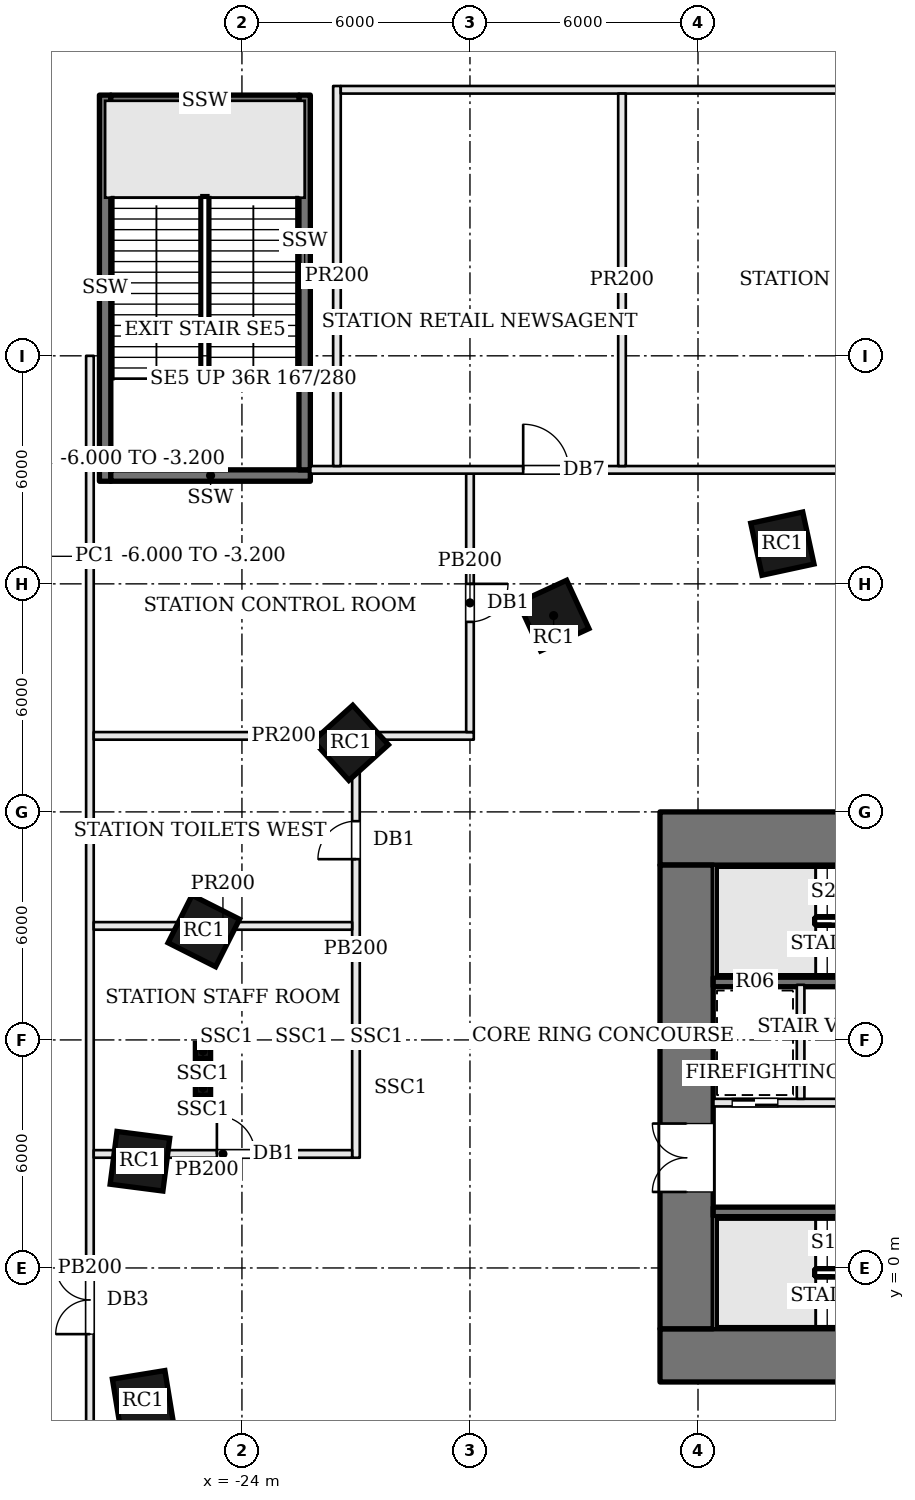
"""IFC4 building model, lengths in metres.
Left out: names, types, materials, properties, quantities, classifications, styles, units other than length and angle.
Written with IfcOpenShell. Run it as: python <this file> out.ifc"""

import sys

from ifc_helpers import new_model, si_unit, direction, frame, frame_2d, origin, origin_2d, place, context, subcontext, project, spatial, rectangle, extrude, element, fill, save


model = new_model("IFC4")
c1 = context("Model", 3, precision=1e-05, world=origin(), true_north=direction((0.0, 1.0)))
c2 = subcontext(c1, "Body", "Model", "MODEL_VIEW")
j1 = project(units=[si_unit("LENGTHUNIT", "METRE"), si_unit("PLANEANGLEUNIT", "RADIAN")], contexts=[c1])
p1 = place(None, origin())
s1 = spatial("IfcSite", under=j1, at=p1, CompositionType="ELEMENT")
p2 = place(p1, origin())
s2 = spatial("IfcBuilding", under=s1, at=p2, CompositionType="ELEMENT")
p3 = place(p2, frame((0.0, 0.0, -6.0)))
s3 = spatial("IfcBuildingStorey", under=s2, at=p3, CompositionType="ELEMENT", Elevation=-6.0)
p4 = place(p3, frame((-13.0, 11.3, 0.0), z_axis=(0.0, 0.0, 1.0), x_axis=(1.0, 0.0, 0.0)))
e1 = element("IfcWall", 1, at=p4, inside=s3, PredefinedType="SHEAR", context=c2, shape_type="SweptSolid", body=[
    extrude(rectangle(XDim=26.0, YDim=1.4, at=frame_2d((13.0, 0.0))), origin(), (0.0, 0.0, 1.0), 6.0),
])
p5 = place(p4, frame((9.375, 0.0, 0.0)))
e2 = element("IfcOpeningElement", 2, at=p5, cuts=e1, PredefinedType="OPENING", context=c2, shape_type="SweptSolid", body=[
    extrude(rectangle(XDim=0.7, YDim=2.1, at=frame_2d((0.35, 1.05))), frame((0.0, 0.71, 0.0), z_axis=(0.0, -1.0, 0.0), x_axis=(1.0, 0.0, 0.0)), (0.0, 0.0, 1.0), 1.42),
])
p6 = place(p4, frame((12.625, 0.0, 0.0)))
e3 = element("IfcOpeningElement", 3, at=p6, cuts=e1, PredefinedType="OPENING", context=c2, shape_type="SweptSolid", body=[
    extrude(rectangle(XDim=0.7, YDim=2.1, at=frame_2d((0.35, 1.05))), frame((0.0, 0.71, 0.0), z_axis=(0.0, -1.0, 0.0), x_axis=(1.0, 0.0, 0.0)), (0.0, 0.0, 1.0), 1.42),
])
p7 = place(p4, frame((14.8, 0.0, 0.0)))
e4 = element("IfcOpeningElement", 4, at=p7, cuts=e1, PredefinedType="OPENING", context=c2, shape_type="SweptSolid", body=[
    extrude(rectangle(XDim=1.0, YDim=2.1, at=frame_2d((0.5, 1.05))), frame((0.0, 0.71, 0.0), z_axis=(0.0, -1.0, 0.0), x_axis=(1.0, 0.0, 0.0)), (0.0, 0.0, 1.0), 1.42),
])
p8 = place(p3, frame((-13.0, -2.3, 0.0), z_axis=(0.0, 0.0, 1.0), x_axis=(1.0, 0.0, 0.0)))
e5 = element("IfcWall", 5, at=p8, inside=s3, PredefinedType="SHEAR", context=c2, shape_type="SweptSolid", body=[
    extrude(rectangle(XDim=26.0, YDim=1.4, at=frame_2d((13.0, 0.0))), origin(), (0.0, 0.0, 1.0), 6.0),
])
p9 = place(p8, frame((9.125, 0.0, 0.0)))
e6 = element("IfcOpeningElement", 6, at=p9, cuts=e5, PredefinedType="OPENING", context=c2, shape_type="SweptSolid", body=[
    extrude(rectangle(XDim=1.2, YDim=2.1, at=frame_2d((0.6, 1.05))), frame((0.0, 0.71, 0.0), z_axis=(0.0, -1.0, 0.0), x_axis=(1.0, 0.0, 0.0)), (0.0, 0.0, 1.0), 1.42),
])
p10 = place(p8, frame((12.625, 0.0, 0.0)))
e7 = element("IfcOpeningElement", 7, at=p10, cuts=e5, PredefinedType="OPENING", context=c2, shape_type="SweptSolid", body=[
    extrude(rectangle(XDim=0.7, YDim=2.1, at=frame_2d((0.35, 1.05))), frame((0.0, 0.71, 0.0), z_axis=(0.0, -1.0, 0.0), x_axis=(1.0, 0.0, 0.0)), (0.0, 0.0, 1.0), 1.42),
])
p11 = place(p8, frame((15.75, 0.0, 0.0)))
e8 = element("IfcOpeningElement", 8, at=p11, cuts=e5, PredefinedType="OPENING", context=c2, shape_type="SweptSolid", body=[
    extrude(rectangle(XDim=1.0, YDim=2.1, at=frame_2d((0.5, 1.05))), frame((0.0, 0.71, 0.0), z_axis=(0.0, -1.0, 0.0), x_axis=(1.0, 0.0, 0.0)), (0.0, 0.0, 1.0), 1.42),
])
p12 = place(p3, frame((-12.3, -1.6, 0.0), z_axis=(0.0, 0.0, 1.0), x_axis=(0.0, 1.0, 0.0)))
e9 = element("IfcWall", 9, at=p12, inside=s3, PredefinedType="SHEAR", context=c2, shape_type="SweptSolid", body=[
    extrude(rectangle(XDim=12.2, YDim=1.4, at=frame_2d((6.1, 0.0))), origin(), (0.0, 0.0, 1.0), 6.0),
])
p13 = place(p12, frame((3.6, 0.0, 0.0)))
e10 = element("IfcOpeningElement", 10, at=p13, cuts=e9, PredefinedType="OPENING", context=c2, shape_type="SweptSolid", body=[
    extrude(rectangle(XDim=1.8, YDim=2.1, at=frame_2d((0.9, 1.05))), frame((0.0, 0.71, 0.0), z_axis=(0.0, -1.0, 0.0), x_axis=(1.0, 0.0, 0.0)), (0.0, 0.0, 1.0), 1.42),
])
for number, where, z_axis, x_axis in (
    (11, (-9.78, 19.058, 0.0), (0.0, 0.0, 1.0), (-0.977, -0.211, 0.0)),
    (12, (-15.799, 17.165, 0.0), (0.0, 0.0, 1.0), (-0.908, -0.419, 0.0)),
    (13, (-21.135, 13.817, 0.0), (0.0, 0.0, 1.0), (-0.743, -0.67, 0.0)),
    (14, (-25.003, 8.866, 0.0), (0.0, 0.0, 1.0), (-0.45, -0.893, 0.0)),
    (15, (-26.684, 2.808, 0.0), (0.0, 0.0, 1.0), (-0.128, -0.992, 0.0)),
    (16, (-26.605, -3.503, 0.0), (0.0, 0.0, 1.0), (0.161, -0.987, 0.0)),
):
    element("IfcColumn", number, at=place(p3, frame(where, z_axis=z_axis, x_axis=x_axis)), inside=s3, PredefinedType="COLUMN", context=c2, shape_type="SweptSolid", body=[
        extrude(rectangle(XDim=1.4, YDim=1.4, at=origin_2d()), origin(), (0.0, 0.0, 1.0), 6.0),
    ])
p14 = place(p3, frame((-11.6, 1.475, 0.0), z_axis=(0.0, 0.0, 1.0), x_axis=(1.0, 0.0, 0.0)))
e17 = element("IfcWall", 17, at=p14, inside=s3, PredefinedType="SOLIDWALL", context=c2, shape_type="SweptSolid", body=[
    extrude(rectangle(XDim=6.5, YDim=0.25, at=frame_2d((3.25, 0.0))), origin(), (0.0, 0.0, 1.0), 5.65),
])
p15 = place(p14, frame((5.2, 0.0, 0.0)))
e18 = element("IfcOpeningElement", 18, at=p15, cuts=e17, PredefinedType="OPENING", context=c2, shape_type="SweptSolid", body=[
    extrude(rectangle(XDim=1.2, YDim=2.1, at=frame_2d((0.6, 1.05))), frame((0.0, 0.135, 0.0), z_axis=(0.0, -1.0, 0.0), x_axis=(1.0, 0.0, 0.0)), (0.0, 0.0, 1.0), 0.27),
])
p16 = place(p3, frame((-11.6, 4.35, 0.0), z_axis=(0.0, 0.0, 1.0), x_axis=(1.0, 0.0, 0.0)))
e19 = element("IfcWall", 19, at=p16, inside=s3, PredefinedType="SOLIDWALL", context=c2, shape_type="SweptSolid", body=[
    extrude(rectangle(XDim=6.5, YDim=0.2, at=frame_2d((3.25, 0.0))), origin(), (0.0, 0.0, 1.0), 5.65),
])
p17 = place(p16, frame((3.8, 0.0, 0.0)))
e20 = element("IfcOpeningElement", 20, at=p17, cuts=e19, PredefinedType="OPENING", context=c2, shape_type="SweptSolid", body=[
    extrude(rectangle(XDim=1.2, YDim=2.1, at=frame_2d((0.6, 1.05))), frame((0.0, 0.11, 0.0), z_axis=(0.0, -1.0, 0.0), x_axis=(1.0, 0.0, 0.0)), (0.0, 0.0, 1.0), 0.22),
])
p18 = place(p16, frame((0.5, 0.0, 0.0)))
e21 = element("IfcOpeningElement", 21, at=p18, cuts=e19, PredefinedType="OPENING", context=c2, shape_type="SweptSolid", body=[
    extrude(rectangle(XDim=1.2, YDim=2.1, at=frame_2d((0.6, 1.05))), frame((0.0, 0.11, 0.0), z_axis=(0.0, -1.0, 0.0), x_axis=(1.0, 0.0, 0.0)), (0.0, 0.0, 1.0), 0.22),
])
p19 = place(p3, frame((-11.6, 7.525, 0.0), z_axis=(0.0, 0.0, 1.0), x_axis=(1.0, 0.0, 0.0)))
e22 = element("IfcWall", 22, at=p19, inside=s3, PredefinedType="SOLIDWALL", context=c2, shape_type="SweptSolid", body=[
    extrude(rectangle(XDim=6.5, YDim=0.25, at=frame_2d((3.25, 0.0))), origin(), (0.0, 0.0, 1.0), 5.65),
])
p20 = place(p19, frame((5.2, 0.0, 0.0)))
e23 = element("IfcOpeningElement", 23, at=p20, cuts=e22, PredefinedType="OPENING", context=c2, shape_type="SweptSolid", body=[
    extrude(rectangle(XDim=1.2, YDim=2.1, at=frame_2d((0.6, 1.05))), frame((0.0, 0.135, 0.0), z_axis=(0.0, -1.0, 0.0), x_axis=(1.0, 0.0, 0.0)), (0.0, 0.0, 1.0), 0.27),
])
p21 = place(p3, frame((-9.3, 4.45, 0.0), z_axis=(0.0, 0.0, 1.0), x_axis=(0.0, 1.0, 0.0)))
e24 = element("IfcWall", 24, at=p21, inside=s3, PredefinedType="SOLIDWALL", context=c2, shape_type="SweptSolid", body=[
    extrude(rectangle(XDim=3.0, YDim=0.2, at=frame_2d((1.5, 0.0))), origin(), (0.0, 0.0, 1.0), 5.65),
])
p22 = place(p3, frame((-28.0, -24.0, 0.0), z_axis=(0.0, 0.0, 1.0), x_axis=(0.0, 1.0, 0.0)))
e25 = element("IfcWall", 25, at=p22, inside=s3, PredefinedType="PARTITIONING", context=c2, shape_type="SweptSolid", body=[
    extrude(rectangle(XDim=48.0, YDim=0.2, at=frame_2d((24.0, 0.0))), origin(), (0.0, 0.0, 1.0), 5.148),
])
p23 = place(p22, frame((22.259, 0.0, 0.0)))
e26 = element("IfcOpeningElement", 26, at=p23, cuts=e25, PredefinedType="OPENING", context=c2, shape_type="SweptSolid", body=[
    extrude(rectangle(XDim=1.8, YDim=2.1, at=frame_2d((0.9, 1.05))), frame((0.0, 0.11, 0.0), z_axis=(0.0, -1.0, 0.0), x_axis=(1.0, 0.0, 0.0)), (0.0, 0.0, 1.0), 0.22),
])
p24 = place(p3, frame((-21.0, 2.9, 0.0), z_axis=(0.0, 0.0, 1.0), x_axis=(0.0, 1.0, 0.0)))
e27 = element("IfcWall", 27, at=p24, inside=s3, PredefinedType="PARTITIONING", context=c2, shape_type="SweptSolid", body=[
    extrude(rectangle(XDim=11.0, YDim=0.2, at=frame_2d((5.5, 0.0))), origin(), (0.0, 0.0, 1.0), 5.148),
])
p25 = place(p24, frame((7.856, 0.0, 0.0)))
e28 = element("IfcOpeningElement", 28, at=p25, cuts=e27, PredefinedType="OPENING", context=c2, shape_type="SweptSolid", body=[
    extrude(rectangle(XDim=1.0, YDim=2.1, at=frame_2d((0.5, 1.05))), frame((0.0, 0.11, 0.0), z_axis=(0.0, -1.0, 0.0), x_axis=(1.0, 0.0, 0.0)), (0.0, 0.0, 1.0), 0.22),
])
p26 = place(p3, frame((-17.9, 14.0, 0.0), z_axis=(0.0, 0.0, 1.0), x_axis=(-1.0, 0.0, 0.0)))
e29 = element("IfcWall", 29, at=p26, inside=s3, PredefinedType="PARTITIONING", context=c2, shape_type="SweptSolid", body=[
    extrude(rectangle(XDim=10.0, YDim=0.2, at=frame_2d((5.0, 0.0))), origin(), (0.0, 0.0, 1.0), 5.134),
])
p27 = place(p3, frame((-27.9, 9.0, 0.0), z_axis=(0.0, 0.0, 1.0), x_axis=(1.0, 0.0, 0.0)))
e30 = element("IfcWall", 30, at=p27, inside=s3, PredefinedType="PARTITIONING", context=c2, shape_type="SweptSolid", body=[
    extrude(rectangle(XDim=6.8, YDim=0.2, at=frame_2d((3.4, 0.0))), origin(), (0.0, 0.0, 1.0), 5.134),
])
p28 = place(p3, frame((-18.0, 20.9, 0.0), z_axis=(0.0, 0.0, 1.0), x_axis=(0.0, -1.0, 0.0)))
e31 = element("IfcWall", 31, at=p28, inside=s3, PredefinedType="PARTITIONING", context=c2, shape_type="SweptSolid", body=[
    extrude(rectangle(XDim=6.8, YDim=0.2, at=frame_2d((3.4, 0.0))), origin(), (0.0, 0.0, 1.0), 5.148),
])
p29 = place(p28, frame((2.9, 0.0, 0.0)))
e32 = element("IfcOpeningElement", 32, at=p29, cuts=e31, PredefinedType="OPENING", context=c2, shape_type="SweptSolid", body=[
    extrude(rectangle(XDim=1.0, YDim=2.1, at=frame_2d((0.5, 1.05))), frame((0.0, 0.11, 0.0), z_axis=(0.0, -1.0, 0.0), x_axis=(1.0, 0.0, 0.0)), (0.0, 0.0, 1.0), 0.22),
])
p30 = place(p3, frame((-27.6, 30.86, 0.0), z_axis=(0.0, 0.0, 1.0), x_axis=(0.0, -1.0, 0.0)))
e33 = element("IfcWall", 33, at=p30, inside=s3, PredefinedType="SOLIDWALL", context=c2, shape_type="SweptSolid", body=[
    extrude(rectangle(XDim=10.16, YDim=0.3, at=frame_2d((5.08, 0.0))), origin(), (0.0, 0.0, 1.0), 5.65),
])
p31 = place(p3, frame((-27.45, 20.85, 0.0), z_axis=(0.0, 0.0, 1.0), x_axis=(1.0, 0.0, 0.0)))
e34 = element("IfcWall", 34, at=p31, inside=s3, PredefinedType="SOLIDWALL", context=c2, shape_type="SweptSolid", body=[
    extrude(rectangle(XDim=5.25, YDim=0.3, at=frame_2d((2.625, 0.0))), origin(), (0.0, 0.0, 1.0), 5.65),
])
p32 = place(p3, frame((-22.35, 21.0, 0.0), z_axis=(0.0, 0.0, 1.0), x_axis=(0.0, 1.0, 0.0)))
e35 = element("IfcWall", 35, at=p32, inside=s3, PredefinedType="SOLIDWALL", context=c2, shape_type="SweptSolid", body=[
    extrude(rectangle(XDim=9.86, YDim=0.3, at=frame_2d((4.93, 0.0))), origin(), (0.0, 0.0, 1.0), 5.65),
])
p33 = place(p3, frame((-22.2, 21.0, 0.0), z_axis=(0.0, 0.0, 1.0), x_axis=(1.0, 0.0, 0.0)))
e36 = element("IfcWall", 36, at=p33, inside=s3, PredefinedType="PARTITIONING", context=c2, shape_type="SweptSolid", body=[
    extrude(rectangle(XDim=44.4, YDim=0.2, at=frame_2d((22.2, 0.0))), origin(), (0.0, 0.0, 1.0), 5.148),
])
p34 = place(p33, frame((5.6, 0.0, 0.0)))
e37 = element("IfcOpeningElement", 37, at=p34, cuts=e36, PredefinedType="OPENING", context=c2, shape_type="SweptSolid", body=[
    extrude(rectangle(XDim=1.2, YDim=2.1, at=frame_2d((0.6, 1.05))), frame((0.0, 0.11, 0.0), z_axis=(0.0, -1.0, 0.0), x_axis=(1.0, 0.0, 0.0)), (0.0, 0.0, 1.0), 0.22),
])
p35 = place(p33, frame((14.6, 0.0, 0.0)))
e38 = element("IfcOpeningElement", 38, at=p35, cuts=e36, PredefinedType="OPENING", context=c2, shape_type="SweptSolid", body=[
    extrude(rectangle(XDim=1.2, YDim=2.1, at=frame_2d((0.6, 1.05))), frame((0.0, 0.11, 0.0), z_axis=(0.0, -1.0, 0.0), x_axis=(1.0, 0.0, 0.0)), (0.0, 0.0, 1.0), 0.22),
])
p36 = place(p33, frame((28.259, 0.0, 0.0)))
e39 = element("IfcOpeningElement", 39, at=p36, cuts=e36, PredefinedType="OPENING", context=c2, shape_type="SweptSolid", body=[
    extrude(rectangle(XDim=1.2, YDim=2.1, at=frame_2d((0.6, 1.05))), frame((0.0, 0.11, 0.0), z_axis=(0.0, -1.0, 0.0), x_axis=(1.0, 0.0, 0.0)), (0.0, 0.0, 1.0), 0.22),
])
p37 = place(p33, frame((37.6, 0.0, 0.0)))
e40 = element("IfcOpeningElement", 40, at=p37, cuts=e36, PredefinedType="OPENING", context=c2, shape_type="SweptSolid", body=[
    extrude(rectangle(XDim=1.2, YDim=2.1, at=frame_2d((0.6, 1.05))), frame((0.0, 0.11, 0.0), z_axis=(0.0, -1.0, 0.0), x_axis=(1.0, 0.0, 0.0)), (0.0, 0.0, 1.0), 0.22),
])
p38 = place(p3, frame((-27.9, 3.0, 0.0), z_axis=(0.0, 0.0, 1.0), x_axis=(1.0, 0.0, 0.0)))
e41 = element("IfcWall", 41, at=p38, inside=s3, PredefinedType="PARTITIONING", context=c2, shape_type="SweptSolid", body=[
    extrude(rectangle(XDim=6.8, YDim=0.2, at=frame_2d((3.4, 0.0))), origin(), (0.0, 0.0, 1.0), 5.148),
])
p39 = place(p38, frame((3.241, 0.0, 0.0)))
e42 = element("IfcOpeningElement", 42, at=p39, cuts=e41, PredefinedType="OPENING", context=c2, shape_type="SweptSolid", body=[
    extrude(rectangle(XDim=1.0, YDim=2.1, at=frame_2d((0.5, 1.05))), frame((0.0, 0.11, 0.0), z_axis=(0.0, -1.0, 0.0), x_axis=(1.0, 0.0, 0.0)), (0.0, 0.0, 1.0), 0.22),
])
p40 = place(p3, frame((-27.45, 30.71, 0.0), z_axis=(0.0, 0.0, 1.0), x_axis=(1.0, 0.0, 0.0)))
e43 = element("IfcWall", 43, at=p40, inside=s3, PredefinedType="SOLIDWALL", context=c2, shape_type="SweptSolid", body=[
    extrude(rectangle(XDim=4.95, YDim=0.3, at=frame_2d((2.475, 0.0))), origin(), (0.0, 0.0, 1.0), 5.65),
])
p41 = place(p3, frame((-21.5, 21.1, 0.0), z_axis=(0.0, 0.0, 1.0), x_axis=(0.0, 1.0, 0.0)))
e44 = element("IfcWall", 44, at=p41, inside=s3, PredefinedType="PARTITIONING", context=c2, shape_type="SweptSolid", body=[
    extrude(rectangle(XDim=10.0, YDim=0.2, at=frame_2d((5.0, 0.0))), origin(), (0.0, 0.0, 1.0), 5.134),
])
p42 = place(p3, frame((-21.4, 31.0, 0.0), z_axis=(0.0, 0.0, 1.0), x_axis=(1.0, 0.0, 0.0)))
e45 = element("IfcWall", 45, at=p42, inside=s3, PredefinedType="PARTITIONING", context=c2, shape_type="SweptSolid", body=[
    extrude(rectangle(XDim=43.0, YDim=0.2, at=frame_2d((21.5, 0.0))), origin(), (0.0, 0.0, 1.0), 5.134),
])
p43 = place(p3, frame((-14.0, 30.9, 0.0), z_axis=(0.0, 0.0, 1.0), x_axis=(0.0, -1.0, 0.0)))
e46 = element("IfcWall", 46, at=p43, inside=s3, PredefinedType="PARTITIONING", context=c2, shape_type="SweptSolid", body=[
    extrude(rectangle(XDim=9.8, YDim=0.2, at=frame_2d((4.9, 0.0))), origin(), (0.0, 0.0, 1.0), 5.134),
])
for number, where, z_axis, x_axis in (
    (47, (-20.45, 6.085, 0.0), (0.0, 0.0, 1.0), (1.0, 0.0, 0.0)),
    (48, (-24.4, 6.085, 0.0), (0.0, 0.0, 1.0), (1.0, 0.0, 0.0)),
    (49, (-22.425, 6.085, 0.0), (0.0, 0.0, 1.0), (1.0, 0.0, 0.0)),
    (50, (-25.025, 5.71, 0.0), (0.0, 0.0, 1.0), (1.0, 0.0, 0.0)),
    (51, (-25.025, 4.745, 0.0), (0.0, 0.0, 1.0), (1.0, 0.0, 0.0)),
    (52, (-19.825, 4.745, 0.0), (0.0, 0.0, 1.0), (1.0, 0.0, 0.0)),
):
    element("IfcColumn", number, at=place(p3, frame(where, z_axis=z_axis, x_axis=x_axis)), inside=s3, PredefinedType="COLUMN", context=c2, shape_type="SweptSolid", body=[
        extrude(rectangle(XDim=0.4, YDim=0.4, at=origin_2d()), origin(), (0.0, 0.0, 1.0), 5.65),
    ])
p44 = place(p13, origin())
e53 = element("IfcDoor", 53, at=p44, inside=s3, OperationType="DOUBLE_DOOR_SINGLE_SWING", PredefinedType="DOOR", context=c2, shape_type="SweptSolid", body=[
    extrude(rectangle(XDim=1.8, YDim=2.1, at=frame_2d((0.9, 1.05))), frame((0.0, 0.025, 0.0), z_axis=(0.0, -1.0, 0.0), x_axis=(1.0, 0.0, 0.0)), (0.0, 0.0, 1.0), 0.05),
])
fill(e10, e53)
p45 = place(p18, origin())
e54 = element("IfcDoor", 54, at=p45, inside=s3, OperationType="SLIDING_TO_RIGHT", PredefinedType="DOOR", context=c2, shape_type="SweptSolid", body=[
    extrude(rectangle(XDim=1.2, YDim=2.1, at=frame_2d((0.6, 1.05))), frame((0.0, 0.025, 0.0), z_axis=(0.0, -1.0, 0.0), x_axis=(1.0, 0.0, 0.0)), (0.0, 0.0, 1.0), 0.05),
])
fill(e21, e54)
p46 = place(p34, origin())
e55 = element("IfcDoor", 55, at=p46, inside=s3, OperationType="SINGLE_SWING_LEFT", PredefinedType="DOOR", context=c2, shape_type="SweptSolid", body=[
    extrude(rectangle(XDim=1.2, YDim=2.1, at=frame_2d((0.6, 1.05))), frame((0.0, 0.025, 0.0), z_axis=(0.0, -1.0, 0.0), x_axis=(1.0, 0.0, 0.0)), (0.0, 0.0, 1.0), 0.05),
])
fill(e37, e55)
p47 = place(p25, origin())
e56 = element("IfcDoor", 56, at=p47, inside=s3, OperationType="SINGLE_SWING_LEFT", PredefinedType="DOOR", context=c2, shape_type="SweptSolid", body=[
    extrude(rectangle(XDim=1.0, YDim=2.1, at=frame_2d((0.5, 1.05))), frame((0.0, 0.025, 0.0), z_axis=(0.0, -1.0, 0.0), x_axis=(1.0, 0.0, 0.0)), (0.0, 0.0, 1.0), 0.05),
])
fill(e28, e56)
p48 = place(p29, origin())
e57 = element("IfcDoor", 57, at=p48, inside=s3, OperationType="SINGLE_SWING_LEFT", PredefinedType="DOOR", context=c2, shape_type="SweptSolid", body=[
    extrude(rectangle(XDim=1.0, YDim=2.1, at=frame_2d((0.5, 1.05))), frame((0.0, 0.025, 0.0), z_axis=(0.0, -1.0, 0.0), x_axis=(1.0, 0.0, 0.0)), (0.0, 0.0, 1.0), 0.05),
])
fill(e32, e57)
p49 = place(p39, origin())
e58 = element("IfcDoor", 58, at=p49, inside=s3, OperationType="SINGLE_SWING_LEFT", PredefinedType="DOOR", context=c2, shape_type="SweptSolid", body=[
    extrude(rectangle(XDim=1.0, YDim=2.1, at=frame_2d((0.5, 1.05))), frame((0.0, 0.025, 0.0), z_axis=(0.0, -1.0, 0.0), x_axis=(1.0, 0.0, 0.0)), (0.0, 0.0, 1.0), 0.05),
])
fill(e42, e58)
p50 = place(p23, origin())
e59 = element("IfcDoor", 59, at=p50, inside=s3, OperationType="DOUBLE_DOOR_SINGLE_SWING", PredefinedType="DOOR", context=c2, shape_type="SweptSolid", body=[
    extrude(rectangle(XDim=1.8, YDim=2.1, at=frame_2d((0.9, 1.05))), frame((0.0, 0.025, 0.0), z_axis=(0.0, -1.0, 0.0), x_axis=(1.0, 0.0, 0.0)), (0.0, 0.0, 1.0), 0.05),
])
fill(e26, e59)
save(model, sys.argv[1])
